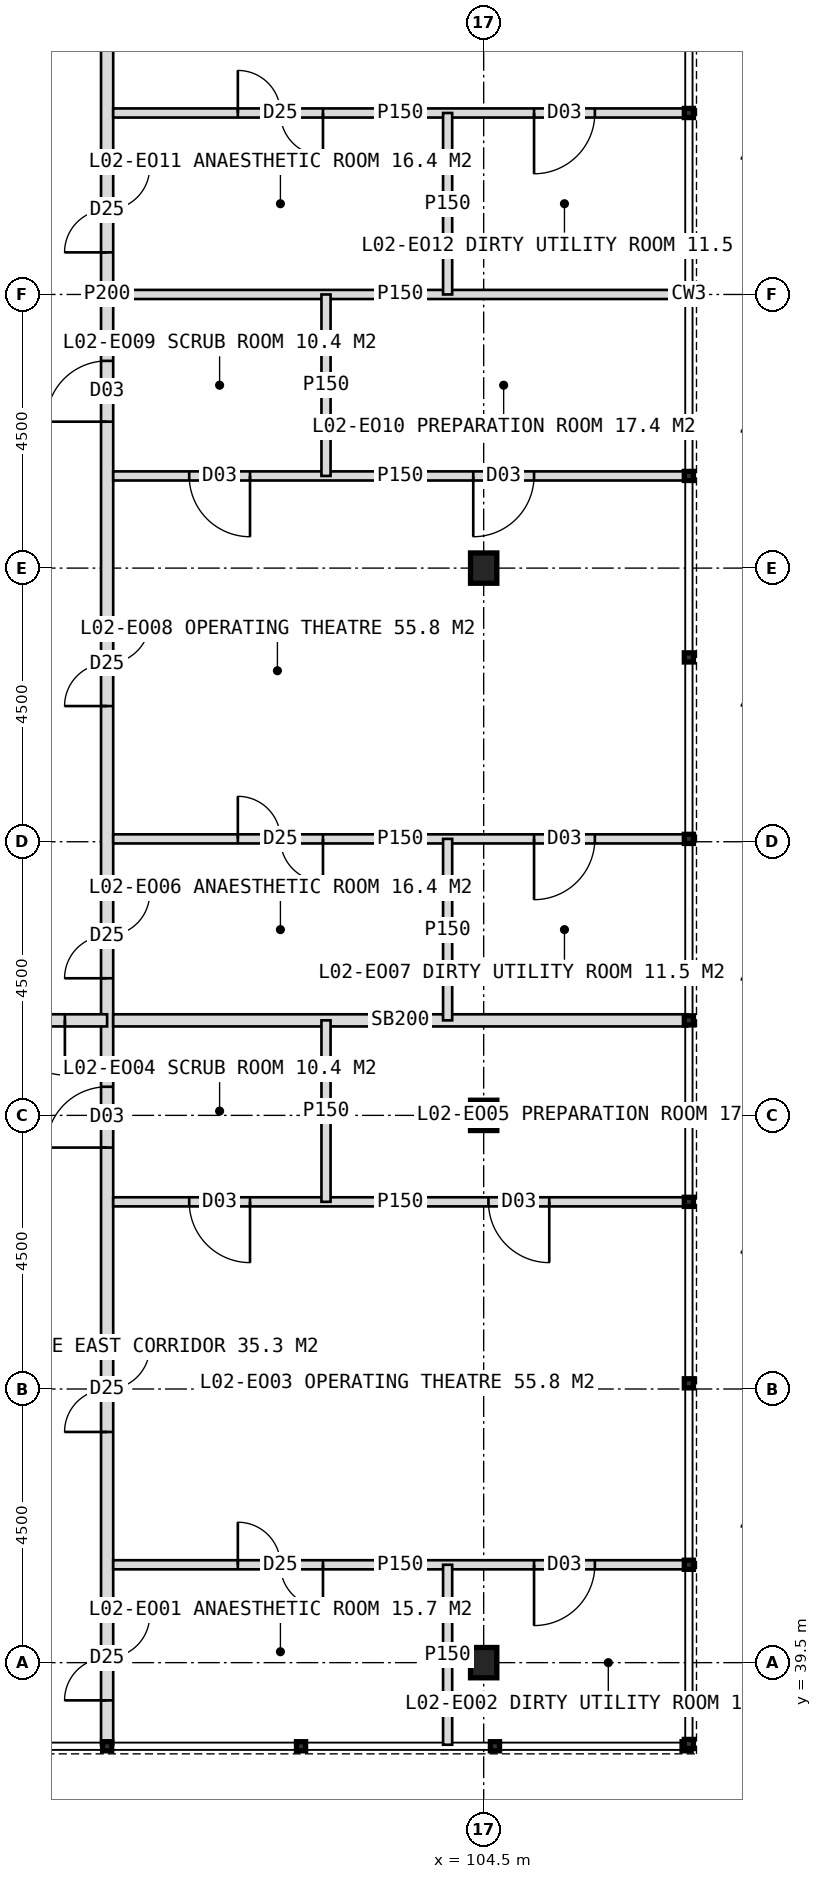
"""IFC4 building model, lengths in metres.
Left out: names, types, materials, properties, quantities, classifications, styles, units other than length and angle.
Written with IfcOpenShell. Run it as: python <this file> out.ifc"""

import sys

from ifc_helpers import new_model, si_unit, direction, frame, frame_2d, origin, origin_2d, place, context, subcontext, project, spatial, rectangle, i_section, extrude, element, fill, save


model = new_model("IFC4")
c1 = context("Model", 3, precision=1e-05, world=origin(), true_north=direction((0.0, 1.0)))
c2 = subcontext(c1, "Body", "Model", "MODEL_VIEW")
j1 = project(units=[si_unit("LENGTHUNIT", "METRE"), si_unit("PLANEANGLEUNIT", "RADIAN")], contexts=[c1])
p1 = place(None, origin())
s1 = spatial("IfcSite", under=j1, at=p1, CompositionType="ELEMENT")
p2 = place(p1, origin())
s2 = spatial("IfcBuilding", under=s1, at=p2, CompositionType="ELEMENT")
p3 = place(p2, frame((0.0, 0.0, 11.0)))
s3 = spatial("IfcBuildingStorey", under=s2, at=p3, CompositionType="ELEMENT", Elevation=11.0)
for number, where, z_axis, x_axis in (
    (1, (104.5, 39.5, 0.0), (0.0, 0.0, 1.0), (1.0, 0.0, 0.0)),
    (2, (104.5, 48.5, 0.0), (0.0, 0.0, 1.0), (1.0, 0.0, 0.0)),
    (3, (104.5, 57.5, 0.0), (0.0, 0.0, 1.0), (1.0, 0.0, 0.0)),
):
    element("IfcColumn", number, at=place(p3, frame(where, z_axis=z_axis, x_axis=x_axis)), inside=s3, PredefinedType="COLUMN", context=c2, shape_type="SweptSolid", body=[
        extrude(i_section(OverallWidth=0.432, OverallDepth=0.498, WebThickness=0.056, FlangeThickness=0.089, FilletRadius=0.015, at=origin_2d()), origin(), (0.0, 0.0, 1.0), 5.5),
    ])
p4 = place(p3, frame((98.307, 38.15, 0.0), z_axis=(0.0, 0.0, 1.0), x_axis=(0.0, 1.0, 0.0)))
e4 = element("IfcWall", 4, at=p4, inside=s3, PredefinedType="PARTITIONING", context=c2, shape_type="SweptSolid", body=[
    extrude(rectangle(XDim=47.7, YDim=0.2, at=frame_2d((23.85, 0.0))), origin(), (0.0, 0.0, 1.0), 5.2),
])
p5 = place(p4, frame((45.7, 0.0, 0.0)))
e5 = element("IfcOpeningElement", 5, at=p5, cuts=e4, PredefinedType="OPENING", context=c2, shape_type="SweptSolid", body=[
    extrude(rectangle(XDim=1.2, YDim=2.1, at=frame_2d((0.6, 1.05))), frame((0.0, 0.11, 0.0), z_axis=(0.0, -1.0, 0.0), x_axis=(1.0, 0.0, 0.0)), (0.0, 0.0, 1.0), 0.22),
])
p6 = place(p4, frame((36.244, 0.0, 0.0)))
e6 = element("IfcOpeningElement", 6, at=p6, cuts=e4, PredefinedType="OPENING", context=c2, shape_type="SweptSolid", body=[
    extrude(rectangle(XDim=1.0, YDim=2.1, at=frame_2d((0.5, 1.05))), frame((0.0, 0.11, 0.0), z_axis=(0.0, -1.0, 0.0), x_axis=(1.0, 0.0, 0.0)), (0.0, 0.0, 1.0), 0.22),
])
p7 = place(p4, frame((0.73, 0.0, 0.0)))
e7 = element("IfcOpeningElement", 7, at=p7, cuts=e4, PredefinedType="OPENING", context=c2, shape_type="SweptSolid", body=[
    extrude(rectangle(XDim=1.4, YDim=2.2, at=frame_2d((0.7, 1.1))), frame((0.0, 0.11, 0.0), z_axis=(0.0, -1.0, 0.0), x_axis=(1.0, 0.0, 0.0)), (0.0, 0.0, 1.0), 0.22),
])
p8 = place(p4, frame((5.144, 0.0, 0.0)))
e8 = element("IfcOpeningElement", 8, at=p8, cuts=e4, PredefinedType="OPENING", context=c2, shape_type="SweptSolid", body=[
    extrude(rectangle(XDim=1.4, YDim=2.2, at=frame_2d((0.7, 1.1))), frame((0.0, 0.11, 0.0), z_axis=(0.0, -1.0, 0.0), x_axis=(1.0, 0.0, 0.0)), (0.0, 0.0, 1.0), 0.22),
])
p9 = place(p4, frame((9.82, 0.0, 0.0)))
e9 = element("IfcOpeningElement", 9, at=p9, cuts=e4, PredefinedType="OPENING", context=c2, shape_type="SweptSolid", body=[
    extrude(rectangle(XDim=1.0, YDim=2.1, at=frame_2d((0.5, 1.05))), frame((0.0, 0.11, 0.0), z_axis=(0.0, -1.0, 0.0), x_axis=(1.0, 0.0, 0.0)), (0.0, 0.0, 1.0), 0.22),
])
p10 = place(p4, frame((12.605, 0.0, 0.0)))
e10 = element("IfcOpeningElement", 10, at=p10, cuts=e4, PredefinedType="OPENING", context=c2, shape_type="SweptSolid", body=[
    extrude(rectangle(XDim=1.4, YDim=2.2, at=frame_2d((0.7, 1.1))), frame((0.0, 0.11, 0.0), z_axis=(0.0, -1.0, 0.0), x_axis=(1.0, 0.0, 0.0)), (0.0, 0.0, 1.0), 0.22),
])
p11 = place(p4, frame((17.081, 0.0, 0.0)))
e11 = element("IfcOpeningElement", 11, at=p11, cuts=e4, PredefinedType="OPENING", context=c2, shape_type="SweptSolid", body=[
    extrude(rectangle(XDim=1.4, YDim=2.2, at=frame_2d((0.7, 1.1))), frame((0.0, 0.11, 0.0), z_axis=(0.0, -1.0, 0.0), x_axis=(1.0, 0.0, 0.0)), (0.0, 0.0, 1.0), 0.22),
])
p12 = place(p4, frame((21.758, 0.0, 0.0)))
e12 = element("IfcOpeningElement", 12, at=p12, cuts=e4, PredefinedType="OPENING", context=c2, shape_type="SweptSolid", body=[
    extrude(rectangle(XDim=1.0, YDim=2.1, at=frame_2d((0.5, 1.05))), frame((0.0, 0.11, 0.0), z_axis=(0.0, -1.0, 0.0), x_axis=(1.0, 0.0, 0.0)), (0.0, 0.0, 1.0), 0.22),
])
p13 = place(p4, frame((24.542, 0.0, 0.0)))
e13 = element("IfcOpeningElement", 13, at=p13, cuts=e4, PredefinedType="OPENING", context=c2, shape_type="SweptSolid", body=[
    extrude(rectangle(XDim=1.4, YDim=2.2, at=frame_2d((0.7, 1.1))), frame((0.0, 0.11, 0.0), z_axis=(0.0, -1.0, 0.0), x_axis=(1.0, 0.0, 0.0)), (0.0, 0.0, 1.0), 0.22),
])
p14 = place(p4, frame((29.019, 0.0, 0.0)))
e14 = element("IfcOpeningElement", 14, at=p14, cuts=e4, PredefinedType="OPENING", context=c2, shape_type="SweptSolid", body=[
    extrude(rectangle(XDim=1.4, YDim=2.2, at=frame_2d((0.7, 1.1))), frame((0.0, 0.11, 0.0), z_axis=(0.0, -1.0, 0.0), x_axis=(1.0, 0.0, 0.0)), (0.0, 0.0, 1.0), 0.22),
])
p15 = place(p4, frame((33.695, 0.0, 0.0)))
e15 = element("IfcOpeningElement", 15, at=p15, cuts=e4, PredefinedType="OPENING", context=c2, shape_type="SweptSolid", body=[
    extrude(rectangle(XDim=1.0, YDim=2.1, at=frame_2d((0.5, 1.05))), frame((0.0, 0.11, 0.0), z_axis=(0.0, -1.0, 0.0), x_axis=(1.0, 0.0, 0.0)), (0.0, 0.0, 1.0), 0.22),
])
p16 = place(p3, frame((98.307, 50.062, 0.0), z_axis=(0.0, 0.0, 1.0), x_axis=(-1.0, 0.0, 0.0)))
e16 = element("IfcWall", 16, at=p16, inside=s3, PredefinedType="SOLIDWALL", context=c2, shape_type="SweptSolid", body=[
    extrude(rectangle(XDim=3.189, YDim=0.2, at=frame_2d((1.594, 0.0))), origin(), (0.0, 0.0, 1.0), 5.2),
])
p17 = place(p16, frame((0.695, 0.0, 0.0)))
e17 = element("IfcOpeningElement", 17, at=p17, cuts=e16, PredefinedType="OPENING", context=c2, shape_type="SweptSolid", body=[
    extrude(rectangle(XDim=1.8, YDim=2.2, at=frame_2d((0.9, 1.1))), frame((0.0, 0.11, 0.0), z_axis=(0.0, -1.0, 0.0), x_axis=(1.0, 0.0, 0.0)), (0.0, 0.0, 1.0), 0.22),
])
p18 = place(p3, frame((107.85, 41.109, 0.0), z_axis=(0.0, 0.0, 1.0), x_axis=(-1.0, 0.0, 0.0)))
e18 = element("IfcWall", 18, at=p18, inside=s3, PredefinedType="PARTITIONING", context=c2, shape_type="SweptSolid", body=[
    extrude(rectangle(XDim=9.443, YDim=0.15, at=frame_2d((4.722, 0.0))), origin(), (0.0, 0.0, 1.0), 5.2),
])
p19 = place(p18, frame((5.993, 0.0, 0.0)))
e19 = element("IfcOpeningElement", 19, at=p19, cuts=e18, PredefinedType="OPENING", context=c2, shape_type="SweptSolid", body=[
    extrude(rectangle(XDim=1.4, YDim=2.2, at=frame_2d((0.7, 1.1))), frame((0.0, 0.085, 0.0), z_axis=(0.0, -1.0, 0.0), x_axis=(1.0, 0.0, 0.0)), (0.0, 0.0, 1.0), 0.17),
])
p20 = place(p18, frame((1.521, 0.0, 0.0)))
e20 = element("IfcOpeningElement", 20, at=p20, cuts=e18, PredefinedType="OPENING", context=c2, shape_type="SweptSolid", body=[
    extrude(rectangle(XDim=1.0, YDim=2.1, at=frame_2d((0.5, 1.05))), frame((0.0, 0.085, 0.0), z_axis=(0.0, -1.0, 0.0), x_axis=(1.0, 0.0, 0.0)), (0.0, 0.0, 1.0), 0.17),
])
p21 = place(p3, frame((107.85, 47.078, 0.0), z_axis=(0.0, 0.0, 1.0), x_axis=(-1.0, 0.0, 0.0)))
e21 = element("IfcWall", 21, at=p21, inside=s3, PredefinedType="PARTITIONING", context=c2, shape_type="SweptSolid", body=[
    extrude(rectangle(XDim=9.443, YDim=0.15, at=frame_2d((4.722, 0.0))), origin(), (0.0, 0.0, 1.0), 5.2),
])
p22 = place(p21, frame((7.193, 0.0, 0.0)))
e22 = element("IfcOpeningElement", 22, at=p22, cuts=e21, PredefinedType="OPENING", context=c2, shape_type="SweptSolid", body=[
    extrude(rectangle(XDim=1.0, YDim=2.1, at=frame_2d((0.5, 1.05))), frame((0.0, 0.085, 0.0), z_axis=(0.0, -1.0, 0.0), x_axis=(1.0, 0.0, 0.0)), (0.0, 0.0, 1.0), 0.17),
])
p23 = place(p21, frame((2.271, 0.0, 0.0)))
e23 = element("IfcOpeningElement", 23, at=p23, cuts=e21, PredefinedType="OPENING", context=c2, shape_type="SweptSolid", body=[
    extrude(rectangle(XDim=1.0, YDim=2.1, at=frame_2d((0.5, 1.05))), frame((0.0, 0.085, 0.0), z_axis=(0.0, -1.0, 0.0), x_axis=(1.0, 0.0, 0.0)), (0.0, 0.0, 1.0), 0.17),
])
p24 = place(p3, frame((107.85, 50.062, 0.0), z_axis=(0.0, 0.0, 1.0), x_axis=(-1.0, 0.0, 0.0)))
e24 = element("IfcWall", 24, at=p24, inside=s3, PredefinedType="SOLIDWALL", context=c2, shape_type="SweptSolid", body=[
    extrude(rectangle(XDim=9.443, YDim=0.2, at=frame_2d((4.722, 0.0))), origin(), (0.0, 0.0, 1.0), 5.2),
])
p25 = place(p3, frame((107.85, 53.047, 0.0), z_axis=(0.0, 0.0, 1.0), x_axis=(-1.0, 0.0, 0.0)))
e25 = element("IfcWall", 25, at=p25, inside=s3, PredefinedType="PARTITIONING", context=c2, shape_type="SweptSolid", body=[
    extrude(rectangle(XDim=9.443, YDim=0.15, at=frame_2d((4.722, 0.0))), origin(), (0.0, 0.0, 1.0), 5.2),
])
p26 = place(p25, frame((5.993, 0.0, 0.0)))
e26 = element("IfcOpeningElement", 26, at=p26, cuts=e25, PredefinedType="OPENING", context=c2, shape_type="SweptSolid", body=[
    extrude(rectangle(XDim=1.4, YDim=2.2, at=frame_2d((0.7, 1.1))), frame((0.0, 0.085, 0.0), z_axis=(0.0, -1.0, 0.0), x_axis=(1.0, 0.0, 0.0)), (0.0, 0.0, 1.0), 0.17),
])
p27 = place(p25, frame((1.521, 0.0, 0.0)))
e27 = element("IfcOpeningElement", 27, at=p27, cuts=e25, PredefinedType="OPENING", context=c2, shape_type="SweptSolid", body=[
    extrude(rectangle(XDim=1.0, YDim=2.1, at=frame_2d((0.5, 1.05))), frame((0.0, 0.085, 0.0), z_axis=(0.0, -1.0, 0.0), x_axis=(1.0, 0.0, 0.0)), (0.0, 0.0, 1.0), 0.17),
])
p28 = place(p3, frame((107.85, 59.016, 0.0), z_axis=(0.0, 0.0, 1.0), x_axis=(-1.0, 0.0, 0.0)))
e28 = element("IfcWall", 28, at=p28, inside=s3, PredefinedType="PARTITIONING", context=c2, shape_type="SweptSolid", body=[
    extrude(rectangle(XDim=9.443, YDim=0.15, at=frame_2d((4.722, 0.0))), origin(), (0.0, 0.0, 1.0), 5.2),
])
p29 = place(p28, frame((7.193, 0.0, 0.0)))
e29 = element("IfcOpeningElement", 29, at=p29, cuts=e28, PredefinedType="OPENING", context=c2, shape_type="SweptSolid", body=[
    extrude(rectangle(XDim=1.0, YDim=2.1, at=frame_2d((0.5, 1.05))), frame((0.0, 0.085, 0.0), z_axis=(0.0, -1.0, 0.0), x_axis=(1.0, 0.0, 0.0)), (0.0, 0.0, 1.0), 0.17),
])
p30 = place(p28, frame((2.521, 0.0, 0.0)))
e30 = element("IfcOpeningElement", 30, at=p30, cuts=e28, PredefinedType="OPENING", context=c2, shape_type="SweptSolid", body=[
    extrude(rectangle(XDim=1.0, YDim=2.1, at=frame_2d((0.5, 1.05))), frame((0.0, 0.085, 0.0), z_axis=(0.0, -1.0, 0.0), x_axis=(1.0, 0.0, 0.0)), (0.0, 0.0, 1.0), 0.17),
])
p31 = place(p3, frame((107.85, 62.0, 0.0), z_axis=(0.0, 0.0, 1.0), x_axis=(-1.0, 0.0, 0.0)))
e31 = element("IfcWall", 31, at=p31, inside=s3, PredefinedType="PARTITIONING", context=c2, shape_type="SweptSolid", body=[
    extrude(rectangle(XDim=9.443, YDim=0.15, at=frame_2d((4.722, 0.0))), origin(), (0.0, 0.0, 1.0), 5.2),
])
p32 = place(p3, frame((107.85, 64.984, 0.0), z_axis=(0.0, 0.0, 1.0), x_axis=(-1.0, 0.0, 0.0)))
e32 = element("IfcWall", 32, at=p32, inside=s3, PredefinedType="PARTITIONING", context=c2, shape_type="SweptSolid", body=[
    extrude(rectangle(XDim=9.443, YDim=0.15, at=frame_2d((4.722, 0.0))), origin(), (0.0, 0.0, 1.0), 5.2),
])
p33 = place(p32, frame((5.993, 0.0, 0.0)))
e33 = element("IfcOpeningElement", 33, at=p33, cuts=e32, PredefinedType="OPENING", context=c2, shape_type="SweptSolid", body=[
    extrude(rectangle(XDim=1.4, YDim=2.2, at=frame_2d((0.7, 1.1))), frame((0.0, 0.085, 0.0), z_axis=(0.0, -1.0, 0.0), x_axis=(1.0, 0.0, 0.0)), (0.0, 0.0, 1.0), 0.17),
])
p34 = place(p32, frame((1.521, 0.0, 0.0)))
e34 = element("IfcOpeningElement", 34, at=p34, cuts=e32, PredefinedType="OPENING", context=c2, shape_type="SweptSolid", body=[
    extrude(rectangle(XDim=1.0, YDim=2.1, at=frame_2d((0.5, 1.05))), frame((0.0, 0.085, 0.0), z_axis=(0.0, -1.0, 0.0), x_axis=(1.0, 0.0, 0.0)), (0.0, 0.0, 1.0), 0.17),
])
p35 = place(p3, frame((103.907, 38.15, 0.0), z_axis=(0.0, 0.0, 1.0), x_axis=(0.0, 1.0, 0.0)))
e35 = element("IfcWall", 35, at=p35, inside=s3, PredefinedType="PARTITIONING", context=c2, shape_type="SweptSolid", body=[
    extrude(rectangle(XDim=2.959, YDim=0.15, at=frame_2d((1.48, 0.0))), origin(), (0.0, 0.0, 1.0), 5.2),
])
for number, where, z_axis, x_axis in (
    (36, (103.907, 50.062, 0.0), (0.0, 0.0, 1.0), (0.0, 1.0, 0.0)),
    (37, (103.907, 62.0, 0.0), (0.0, 0.0, 1.0), (0.0, 1.0, 0.0)),
    (38, (101.907, 47.078, 0.0), (0.0, 0.0, 1.0), (0.0, 1.0, 0.0)),
    (39, (101.907, 59.016, 0.0), (0.0, 0.0, 1.0), (0.0, 1.0, 0.0)),
):
    element("IfcWall", number, at=place(p3, frame(where, z_axis=z_axis, x_axis=x_axis)), inside=s3, PredefinedType="PARTITIONING", context=c2, shape_type="SweptSolid", body=[
        extrude(rectangle(XDim=2.984, YDim=0.15, at=frame_2d((1.492, 0.0))), origin(), (0.0, 0.0, 1.0), 5.2),
    ])
p36 = place(p17, origin())
e40 = element("IfcDoor", 40, at=p36, inside=s3, OperationType="DOUBLE_DOOR_DOUBLE_SWING", PredefinedType="DOOR", context=c2, shape_type="SweptSolid", body=[
    extrude(rectangle(XDim=1.8, YDim=2.2, at=frame_2d((0.9, 1.1))), frame((0.0, 0.025, 0.0), z_axis=(0.0, -1.0, 0.0), x_axis=(1.0, 0.0, 0.0)), (0.0, 0.0, 1.0), 0.05),
])
fill(e17, e40)
p37 = place(p7, origin())
e41 = element("IfcDoor", 41, at=p37, inside=s3, OperationType="DOUBLE_DOOR_SINGLE_SWING", PredefinedType="DOOR", context=c2, shape_type="SweptSolid", body=[
    extrude(rectangle(XDim=1.4, YDim=2.2, at=frame_2d((0.7, 1.1))), frame((0.0, 0.025, 0.0), z_axis=(0.0, -1.0, 0.0), x_axis=(1.0, 0.0, 0.0)), (0.0, 0.0, 1.0), 0.05),
])
fill(e7, e41)
p38 = place(p19, origin())
e42 = element("IfcDoor", 42, at=p38, inside=s3, OperationType="DOUBLE_DOOR_SINGLE_SWING", PredefinedType="DOOR", context=c2, shape_type="SweptSolid", body=[
    extrude(rectangle(XDim=1.4, YDim=2.2, at=frame_2d((0.7, 1.1))), frame((0.0, 0.025, 0.0), z_axis=(0.0, -1.0, 0.0), x_axis=(1.0, 0.0, 0.0)), (0.0, 0.0, 1.0), 0.05),
])
fill(e19, e42)
p39 = place(p20, origin())
e43 = element("IfcDoor", 43, at=p39, inside=s3, OperationType="SINGLE_SWING_RIGHT", PredefinedType="DOOR", context=c2, shape_type="SweptSolid", body=[
    extrude(rectangle(XDim=1.0, YDim=2.1, at=frame_2d((0.5, 1.05))), frame((0.0, 0.025, 0.0), z_axis=(0.0, -1.0, 0.0), x_axis=(1.0, 0.0, 0.0)), (0.0, 0.0, 1.0), 0.05),
])
fill(e20, e43)
p40 = place(p8, origin())
e44 = element("IfcDoor", 44, at=p40, inside=s3, OperationType="DOUBLE_DOOR_SINGLE_SWING", PredefinedType="DOOR", context=c2, shape_type="SweptSolid", body=[
    extrude(rectangle(XDim=1.4, YDim=2.2, at=frame_2d((0.7, 1.1))), frame((0.0, 0.025, 0.0), z_axis=(0.0, -1.0, 0.0), x_axis=(1.0, 0.0, 0.0)), (0.0, 0.0, 1.0), 0.05),
])
fill(e8, e44)
p41 = place(p9, origin())
e45 = element("IfcDoor", 45, at=p41, inside=s3, OperationType="SINGLE_SWING_LEFT", PredefinedType="DOOR", context=c2, shape_type="SweptSolid", body=[
    extrude(rectangle(XDim=1.0, YDim=2.1, at=frame_2d((0.5, 1.05))), frame((0.0, 0.025, 0.0), z_axis=(0.0, -1.0, 0.0), x_axis=(1.0, 0.0, 0.0)), (0.0, 0.0, 1.0), 0.05),
])
fill(e9, e45)
p42 = place(p22, origin())
e46 = element("IfcDoor", 46, at=p42, inside=s3, OperationType="SINGLE_SWING_LEFT", PredefinedType="DOOR", context=c2, shape_type="SweptSolid", body=[
    extrude(rectangle(XDim=1.0, YDim=2.1, at=frame_2d((0.5, 1.05))), frame((0.0, 0.025, 0.0), z_axis=(0.0, -1.0, 0.0), x_axis=(1.0, 0.0, 0.0)), (0.0, 0.0, 1.0), 0.05),
])
fill(e22, e46)
p43 = place(p23, origin())
e47 = element("IfcDoor", 47, at=p43, inside=s3, OperationType="SINGLE_SWING_LEFT", PredefinedType="DOOR", context=c2, shape_type="SweptSolid", body=[
    extrude(rectangle(XDim=1.0, YDim=2.1, at=frame_2d((0.5, 1.05))), frame((0.0, 0.025, 0.0), z_axis=(0.0, -1.0, 0.0), x_axis=(1.0, 0.0, 0.0)), (0.0, 0.0, 1.0), 0.05),
])
fill(e23, e47)
p44 = place(p10, origin())
e48 = element("IfcDoor", 48, at=p44, inside=s3, OperationType="DOUBLE_DOOR_SINGLE_SWING", PredefinedType="DOOR", context=c2, shape_type="SweptSolid", body=[
    extrude(rectangle(XDim=1.4, YDim=2.2, at=frame_2d((0.7, 1.1))), frame((0.0, 0.025, 0.0), z_axis=(0.0, -1.0, 0.0), x_axis=(1.0, 0.0, 0.0)), (0.0, 0.0, 1.0), 0.05),
])
fill(e10, e48)
p45 = place(p26, origin())
e49 = element("IfcDoor", 49, at=p45, inside=s3, OperationType="DOUBLE_DOOR_SINGLE_SWING", PredefinedType="DOOR", context=c2, shape_type="SweptSolid", body=[
    extrude(rectangle(XDim=1.4, YDim=2.2, at=frame_2d((0.7, 1.1))), frame((0.0, 0.025, 0.0), z_axis=(0.0, -1.0, 0.0), x_axis=(1.0, 0.0, 0.0)), (0.0, 0.0, 1.0), 0.05),
])
fill(e26, e49)
p46 = place(p27, origin())
e50 = element("IfcDoor", 50, at=p46, inside=s3, OperationType="SINGLE_SWING_RIGHT", PredefinedType="DOOR", context=c2, shape_type="SweptSolid", body=[
    extrude(rectangle(XDim=1.0, YDim=2.1, at=frame_2d((0.5, 1.05))), frame((0.0, 0.025, 0.0), z_axis=(0.0, -1.0, 0.0), x_axis=(1.0, 0.0, 0.0)), (0.0, 0.0, 1.0), 0.05),
])
fill(e27, e50)
p47 = place(p11, origin())
e51 = element("IfcDoor", 51, at=p47, inside=s3, OperationType="DOUBLE_DOOR_SINGLE_SWING", PredefinedType="DOOR", context=c2, shape_type="SweptSolid", body=[
    extrude(rectangle(XDim=1.4, YDim=2.2, at=frame_2d((0.7, 1.1))), frame((0.0, 0.025, 0.0), z_axis=(0.0, -1.0, 0.0), x_axis=(1.0, 0.0, 0.0)), (0.0, 0.0, 1.0), 0.05),
])
fill(e11, e51)
p48 = place(p12, origin())
e52 = element("IfcDoor", 52, at=p48, inside=s3, OperationType="SINGLE_SWING_LEFT", PredefinedType="DOOR", context=c2, shape_type="SweptSolid", body=[
    extrude(rectangle(XDim=1.0, YDim=2.1, at=frame_2d((0.5, 1.05))), frame((0.0, 0.025, 0.0), z_axis=(0.0, -1.0, 0.0), x_axis=(1.0, 0.0, 0.0)), (0.0, 0.0, 1.0), 0.05),
])
fill(e12, e52)
p49 = place(p29, origin())
e53 = element("IfcDoor", 53, at=p49, inside=s3, OperationType="SINGLE_SWING_LEFT", PredefinedType="DOOR", context=c2, shape_type="SweptSolid", body=[
    extrude(rectangle(XDim=1.0, YDim=2.1, at=frame_2d((0.5, 1.05))), frame((0.0, 0.025, 0.0), z_axis=(0.0, -1.0, 0.0), x_axis=(1.0, 0.0, 0.0)), (0.0, 0.0, 1.0), 0.05),
])
fill(e29, e53)
p50 = place(p30, origin())
e54 = element("IfcDoor", 54, at=p50, inside=s3, OperationType="SINGLE_SWING_RIGHT", PredefinedType="DOOR", context=c2, shape_type="SweptSolid", body=[
    extrude(rectangle(XDim=1.0, YDim=2.1, at=frame_2d((0.5, 1.05))), frame((0.0, 0.025, 0.0), z_axis=(0.0, -1.0, 0.0), x_axis=(1.0, 0.0, 0.0)), (0.0, 0.0, 1.0), 0.05),
])
fill(e30, e54)
p51 = place(p13, origin())
e55 = element("IfcDoor", 55, at=p51, inside=s3, OperationType="DOUBLE_DOOR_SINGLE_SWING", PredefinedType="DOOR", context=c2, shape_type="SweptSolid", body=[
    extrude(rectangle(XDim=1.4, YDim=2.2, at=frame_2d((0.7, 1.1))), frame((0.0, 0.025, 0.0), z_axis=(0.0, -1.0, 0.0), x_axis=(1.0, 0.0, 0.0)), (0.0, 0.0, 1.0), 0.05),
])
fill(e13, e55)
p52 = place(p33, origin())
e56 = element("IfcDoor", 56, at=p52, inside=s3, OperationType="DOUBLE_DOOR_SINGLE_SWING", PredefinedType="DOOR", context=c2, shape_type="SweptSolid", body=[
    extrude(rectangle(XDim=1.4, YDim=2.2, at=frame_2d((0.7, 1.1))), frame((0.0, 0.025, 0.0), z_axis=(0.0, -1.0, 0.0), x_axis=(1.0, 0.0, 0.0)), (0.0, 0.0, 1.0), 0.05),
])
fill(e33, e56)
p53 = place(p34, origin())
e57 = element("IfcDoor", 57, at=p53, inside=s3, OperationType="SINGLE_SWING_RIGHT", PredefinedType="DOOR", context=c2, shape_type="SweptSolid", body=[
    extrude(rectangle(XDim=1.0, YDim=2.1, at=frame_2d((0.5, 1.05))), frame((0.0, 0.025, 0.0), z_axis=(0.0, -1.0, 0.0), x_axis=(1.0, 0.0, 0.0)), (0.0, 0.0, 1.0), 0.05),
])
fill(e34, e57)
save(model, sys.argv[1])
